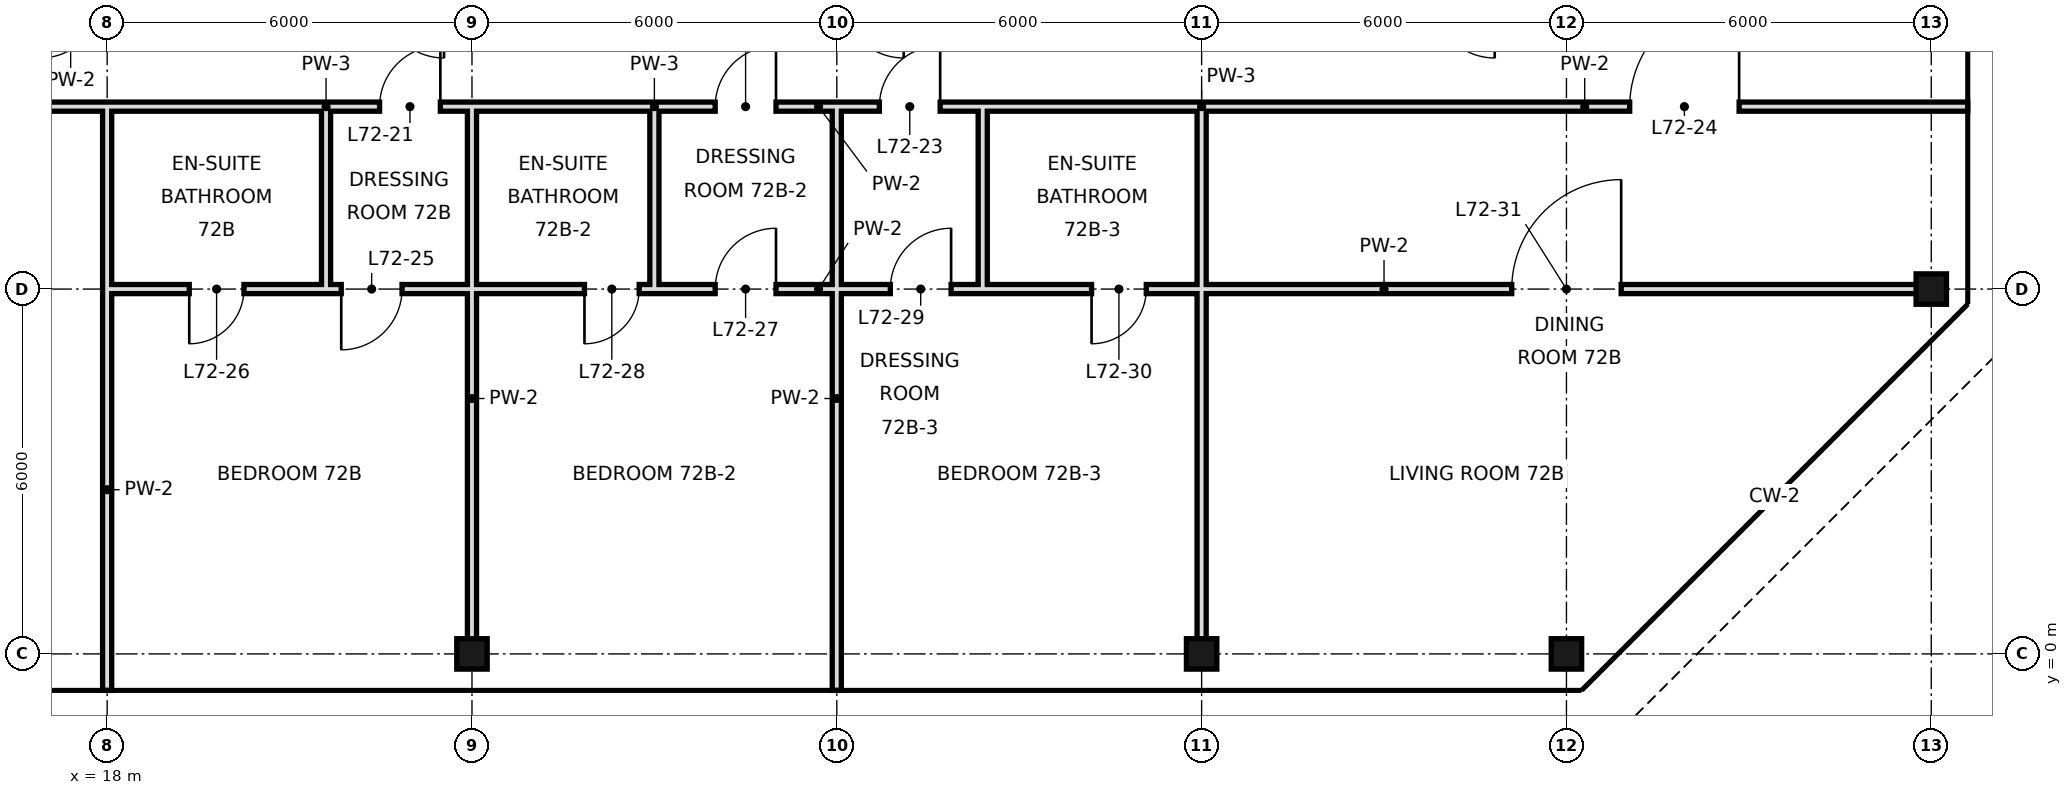
"""IFC4 building model, lengths in metres.
Left out: names, types, materials, properties, quantities, classifications, styles, units other than length and angle.
Written with IfcOpenShell. Run it as: python <this file> out.ifc"""

import sys

from ifc_helpers import new_model, si_unit, direction, frame, frame_2d, origin, origin_2d, place, context, subcontext, project, spatial, rectangle, hollow_rectangle, extrude, element, fill, save


model = new_model("IFC4")
c1 = context("Model", 3, precision=1e-05, world=origin(), true_north=direction((0.0, 1.0)))
c2 = subcontext(c1, "Body", "Model", "MODEL_VIEW")
j1 = project(units=[si_unit("LENGTHUNIT", "METRE"), si_unit("PLANEANGLEUNIT", "RADIAN")], contexts=[c1])
p1 = place(None, origin())
s1 = spatial("IfcSite", under=j1, at=p1, CompositionType="ELEMENT")
p2 = place(p1, origin())
s2 = spatial("IfcBuilding", under=s1, at=p2, CompositionType="ELEMENT")
p3 = place(p2, frame((0.0, 0.0, 305.2)))
s3 = spatial("IfcBuildingStorey", under=s2, at=p3, CompositionType="ELEMENT", Elevation=305.2)
for number, where, z_axis, x_axis in (
    (1, (24.0, 0.0, 0.0), (0.0, 0.0, 1.0), (1.0, 0.0, 0.0)),
    (2, (36.0, 0.0, 0.0), (0.0, 0.0, 1.0), (1.0, 0.0, 0.0)),
    (3, (42.0, 0.0, 0.0), (0.0, 0.0, 1.0), (1.0, 0.0, 0.0)),
    (4, (48.0, 6.0, 0.0), (0.0, 0.0, 1.0), (1.0, 0.0, 0.0)),
):
    element("IfcColumn", number, at=place(p3, frame(where, z_axis=z_axis, x_axis=x_axis)), inside=s3, PredefinedType="COLUMN", context=c2, shape_type="SweptSolid", body=[
        extrude(hollow_rectangle(XDim=0.5, YDim=0.5, WallThickness=0.025, at=origin_2d()), origin(), (0.0, 0.0, 1.0), 3.6),
    ])
p4 = place(p3, frame((18.0, -0.6, 0.0), z_axis=(0.0, 0.0, 1.0), x_axis=(0.0, 1.0, 0.0)))
e5 = element("IfcWall", 5, at=p4, inside=s3, PredefinedType="PARTITIONING", context=c2, shape_type="SweptSolid", body=[
    extrude(rectangle(XDim=6.6, YDim=0.15, at=frame_2d((3.3, 0.0))), origin(), (0.0, 0.0, 1.0), 2.72),
])
p5 = place(p3, frame((18.0, 6.0, 0.0), z_axis=(0.0, 0.0, 1.0), x_axis=(0.0, 1.0, 0.0)))
e6 = element("IfcWall", 6, at=p5, inside=s3, PredefinedType="PARTITIONING", context=c2, shape_type="SweptSolid", body=[
    extrude(rectangle(XDim=3.0, YDim=0.15, at=frame_2d((1.5, 0.0))), origin(), (0.0, 0.0, 1.0), 2.72),
])
p6 = place(p3, frame((21.6, 6.0, 0.0), z_axis=(0.0, 0.0, 1.0), x_axis=(0.0, 1.0, 0.0)))
e7 = element("IfcWall", 7, at=p6, inside=s3, PredefinedType="PARTITIONING", context=c2, shape_type="SweptSolid", body=[
    extrude(rectangle(XDim=3.0, YDim=0.15, at=frame_2d((1.5, 0.0))), origin(), (0.0, 0.0, 1.0), 3.42),
])
p7 = place(p3, frame((24.0, 0.0, 0.0), z_axis=(0.0, 0.0, 1.0), x_axis=(0.0, 1.0, 0.0)))
e8 = element("IfcWall", 8, at=p7, inside=s3, PredefinedType="PARTITIONING", context=c2, shape_type="SweptSolid", body=[
    extrude(rectangle(XDim=6.0, YDim=0.15, at=frame_2d((3.0, 0.0))), origin(), (0.0, 0.0, 1.0), 2.72),
])
p8 = place(p3, frame((24.0, 6.0, 0.0), z_axis=(0.0, 0.0, 1.0), x_axis=(0.0, 1.0, 0.0)))
e9 = element("IfcWall", 9, at=p8, inside=s3, PredefinedType="PARTITIONING", context=c2, shape_type="SweptSolid", body=[
    extrude(rectangle(XDim=3.0, YDim=0.15, at=frame_2d((1.5, 0.0))), origin(), (0.0, 0.0, 1.0), 2.72),
])
p9 = place(p3, frame((27.0, 6.0, 0.0), z_axis=(0.0, 0.0, 1.0), x_axis=(0.0, 1.0, 0.0)))
e10 = element("IfcWall", 10, at=p9, inside=s3, PredefinedType="PARTITIONING", context=c2, shape_type="SweptSolid", body=[
    extrude(rectangle(XDim=3.0, YDim=0.15, at=frame_2d((1.5, 0.0))), origin(), (0.0, 0.0, 1.0), 3.42),
])
p10 = place(p3, frame((30.0, -0.6, 0.0), z_axis=(0.0, 0.0, 1.0), x_axis=(0.0, 1.0, 0.0)))
e11 = element("IfcWall", 11, at=p10, inside=s3, PredefinedType="PARTITIONING", context=c2, shape_type="SweptSolid", body=[
    extrude(rectangle(XDim=9.6, YDim=0.15, at=frame_2d((4.8, 0.0))), origin(), (0.0, 0.0, 1.0), 2.72),
])
p11 = place(p3, frame((32.4, 6.0, 0.0), z_axis=(0.0, 0.0, 1.0), x_axis=(0.0, 1.0, 0.0)))
e12 = element("IfcWall", 12, at=p11, inside=s3, PredefinedType="PARTITIONING", context=c2, shape_type="SweptSolid", body=[
    extrude(rectangle(XDim=3.0, YDim=0.15, at=frame_2d((1.5, 0.0))), origin(), (0.0, 0.0, 1.0), 3.42),
])
p12 = place(p3, frame((36.0, 0.0, 0.0), z_axis=(0.0, 0.0, 1.0), x_axis=(0.0, 1.0, 0.0)))
e13 = element("IfcWall", 13, at=p12, inside=s3, PredefinedType="PARTITIONING", context=c2, shape_type="SweptSolid", body=[
    extrude(rectangle(XDim=6.0, YDim=0.15, at=frame_2d((3.0, 0.0))), origin(), (0.0, 0.0, 1.0), 2.72),
])
p13 = place(p3, frame((36.0, 6.0, 0.0), z_axis=(0.0, 0.0, 1.0), x_axis=(0.0, 1.0, 0.0)))
e14 = element("IfcWall", 14, at=p13, inside=s3, PredefinedType="PARTITIONING", context=c2, shape_type="SweptSolid", body=[
    extrude(rectangle(XDim=3.0, YDim=0.15, at=frame_2d((1.5, 0.0))), origin(), (0.0, 0.0, 1.0), 2.72),
])
p14 = place(p3, frame((21.6, 6.0, 0.0), z_axis=(0.0, 0.0, 1.0), x_axis=(1.0, 0.0, 0.0)))
e15 = element("IfcWall", 15, at=p14, inside=s3, PredefinedType="PARTITIONING", context=c2, shape_type="SweptSolid", body=[
    extrude(rectangle(XDim=2.4, YDim=0.15, at=frame_2d((1.2, 0.0))), origin(), (0.0, 0.0, 1.0), 2.97),
])
p15 = place(p14, frame((0.25, 0.0, 0.0)))
e16 = element("IfcOpeningElement", 16, at=p15, cuts=e15, PredefinedType="OPENING", context=c2, shape_type="SweptSolid", body=[
    extrude(rectangle(XDim=1.0, YDim=2.4, at=frame_2d((0.5, 1.2))), frame((0.0, 0.085, 0.0), z_axis=(0.0, -1.0, 0.0), x_axis=(1.0, 0.0, 0.0)), (0.0, 0.0, 1.0), 0.17),
])
p16 = place(p3, frame((27.0, 6.0, 0.0), z_axis=(0.0, 0.0, 1.0), x_axis=(1.0, 0.0, 0.0)))
e17 = element("IfcWall", 17, at=p16, inside=s3, PredefinedType="PARTITIONING", context=c2, shape_type="SweptSolid", body=[
    extrude(rectangle(XDim=5.4, YDim=0.15, at=frame_2d((2.7, 0.0))), origin(), (0.0, 0.0, 1.0), 2.97),
])
p17 = place(p16, frame((1.0, 0.0, 0.0)))
e18 = element("IfcOpeningElement", 18, at=p17, cuts=e17, PredefinedType="OPENING", context=c2, shape_type="SweptSolid", body=[
    extrude(rectangle(XDim=1.0, YDim=2.4, at=frame_2d((0.5, 1.2))), frame((0.0, 0.085, 0.0), z_axis=(0.0, -1.0, 0.0), x_axis=(1.0, 0.0, 0.0)), (0.0, 0.0, 1.0), 0.17),
])
p18 = place(p16, frame((3.88, 0.0, 0.0)))
e19 = element("IfcOpeningElement", 19, at=p18, cuts=e17, PredefinedType="OPENING", context=c2, shape_type="SweptSolid", body=[
    extrude(rectangle(XDim=1.0, YDim=2.4, at=frame_2d((0.5, 1.2))), frame((0.0, 0.085, 0.0), z_axis=(0.0, -1.0, 0.0), x_axis=(1.0, 0.0, 0.0)), (0.0, 0.0, 1.0), 0.17),
])
p19 = place(p3, frame((36.0, 6.0, 0.0), z_axis=(0.0, 0.0, 1.0), x_axis=(1.0, 0.0, 0.0)))
e20 = element("IfcWall", 20, at=p19, inside=s3, PredefinedType="PARTITIONING", context=c2, shape_type="SweptSolid", body=[
    extrude(rectangle(XDim=12.0, YDim=0.15, at=frame_2d((6.0, 0.0))), origin(), (0.0, 0.0, 1.0), 2.97),
])
p20 = place(p19, frame((5.1, 0.0, 0.0)))
e21 = element("IfcOpeningElement", 21, at=p20, cuts=e20, PredefinedType="OPENING", context=c2, shape_type="SweptSolid", body=[
    extrude(rectangle(XDim=1.8, YDim=2.4, at=frame_2d((0.9, 1.2))), frame((0.0, 0.085, 0.0), z_axis=(0.0, -1.0, 0.0), x_axis=(1.0, 0.0, 0.0)), (0.0, 0.0, 1.0), 0.17),
])
p21 = place(p3, frame((18.0, 6.0, 0.0), z_axis=(0.0, 0.0, 1.0), x_axis=(1.0, 0.0, 0.0)))
e22 = element("IfcWall", 22, at=p21, inside=s3, PredefinedType="PARTITIONING", context=c2, shape_type="SweptSolid", body=[
    extrude(rectangle(XDim=3.6, YDim=0.15, at=frame_2d((1.8, 0.0))), origin(), (0.0, 0.0, 1.0), 2.97),
])
p22 = place(p21, frame((1.35, 0.0, 0.0)))
e23 = element("IfcOpeningElement", 23, at=p22, cuts=e22, PredefinedType="OPENING", context=c2, shape_type="SweptSolid", body=[
    extrude(rectangle(XDim=0.9, YDim=2.4, at=frame_2d((0.45, 1.2))), frame((0.0, 0.085, 0.0), z_axis=(0.0, -1.0, 0.0), x_axis=(1.0, 0.0, 0.0)), (0.0, 0.0, 1.0), 0.17),
])
p23 = place(p3, frame((24.0, 6.0, 0.0), z_axis=(0.0, 0.0, 1.0), x_axis=(1.0, 0.0, 0.0)))
e24 = element("IfcWall", 24, at=p23, inside=s3, PredefinedType="PARTITIONING", context=c2, shape_type="SweptSolid", body=[
    extrude(rectangle(XDim=3.0, YDim=0.15, at=frame_2d((1.5, 0.0))), origin(), (0.0, 0.0, 1.0), 2.97),
])
p24 = place(p23, frame((1.85, 0.0, 0.0)))
e25 = element("IfcOpeningElement", 25, at=p24, cuts=e24, PredefinedType="OPENING", context=c2, shape_type="SweptSolid", body=[
    extrude(rectangle(XDim=0.9, YDim=2.4, at=frame_2d((0.45, 1.2))), frame((0.0, 0.085, 0.0), z_axis=(0.0, -1.0, 0.0), x_axis=(1.0, 0.0, 0.0)), (0.0, 0.0, 1.0), 0.17),
])
p25 = place(p3, frame((32.4, 6.0, 0.0), z_axis=(0.0, 0.0, 1.0), x_axis=(1.0, 0.0, 0.0)))
e26 = element("IfcWall", 26, at=p25, inside=s3, PredefinedType="PARTITIONING", context=c2, shape_type="SweptSolid", body=[
    extrude(rectangle(XDim=3.6, YDim=0.15, at=frame_2d((1.8, 0.0))), origin(), (0.0, 0.0, 1.0), 2.97),
])
p26 = place(p25, frame((1.79, 0.0, 0.0)))
e27 = element("IfcOpeningElement", 27, at=p26, cuts=e26, PredefinedType="OPENING", context=c2, shape_type="SweptSolid", body=[
    extrude(rectangle(XDim=0.9, YDim=2.4, at=frame_2d((0.45, 1.2))), frame((0.0, 0.085, 0.0), z_axis=(0.0, -1.0, 0.0), x_axis=(1.0, 0.0, 0.0)), (0.0, 0.0, 1.0), 0.17),
])
p27 = place(p3, frame((8.4, 9.0, 0.0), z_axis=(0.0, 0.0, 1.0), x_axis=(1.0, 0.0, 0.0)))
e28 = element("IfcWall", 28, at=p27, inside=s3, PredefinedType="PARTITIONING", context=c2, shape_type="SweptSolid", body=[
    extrude(rectangle(XDim=9.6, YDim=0.15, at=frame_2d((4.8, 0.0))), origin(), (0.0, 0.0, 1.0), 3.42),
])
p28 = place(p27, frame((1.72, 0.0, 0.0)))
e29 = element("IfcOpeningElement", 29, at=p28, cuts=e28, PredefinedType="OPENING", context=c2, shape_type="SweptSolid", body=[
    extrude(rectangle(XDim=1.0, YDim=2.4, at=frame_2d((0.5, 1.2))), frame((0.0, 0.085, 0.0), z_axis=(0.0, -1.0, 0.0), x_axis=(1.0, 0.0, 0.0)), (0.0, 0.0, 1.0), 0.17),
])
p29 = place(p27, frame((5.2, 0.0, 0.0)))
e30 = element("IfcOpeningElement", 30, at=p29, cuts=e28, PredefinedType="OPENING", context=c2, shape_type="SweptSolid", body=[
    extrude(rectangle(XDim=1.0, YDim=2.4, at=frame_2d((0.5, 1.2))), frame((0.0, 0.085, 0.0), z_axis=(0.0, -1.0, 0.0), x_axis=(1.0, 0.0, 0.0)), (0.0, 0.0, 1.0), 0.17),
])
p30 = place(p3, frame((21.6, 9.0, 0.0), z_axis=(0.0, 0.0, 1.0), x_axis=(1.0, 0.0, 0.0)))
e31 = element("IfcWall", 31, at=p30, inside=s3, PredefinedType="PARTITIONING", context=c2, shape_type="SweptSolid", body=[
    extrude(rectangle(XDim=2.4, YDim=0.15, at=frame_2d((1.2, 0.0))), origin(), (0.0, 0.0, 1.0), 3.42),
])
p31 = place(p30, frame((0.88, 0.0, 0.0)))
e32 = element("IfcOpeningElement", 32, at=p31, cuts=e31, PredefinedType="OPENING", context=c2, shape_type="SweptSolid", body=[
    extrude(rectangle(XDim=1.0, YDim=2.4, at=frame_2d((0.5, 1.2))), frame((0.0, 0.085, 0.0), z_axis=(0.0, -1.0, 0.0), x_axis=(1.0, 0.0, 0.0)), (0.0, 0.0, 1.0), 0.17),
])
p32 = place(p3, frame((27.0, 9.0, 0.0), z_axis=(0.0, 0.0, 1.0), x_axis=(1.0, 0.0, 0.0)))
e33 = element("IfcWall", 33, at=p32, inside=s3, PredefinedType="PARTITIONING", context=c2, shape_type="SweptSolid", body=[
    extrude(rectangle(XDim=5.4, YDim=0.15, at=frame_2d((2.7, 0.0))), origin(), (0.0, 0.0, 1.0), 3.42),
])
p33 = place(p32, frame((1.0, 0.0, 0.0)))
e34 = element("IfcOpeningElement", 34, at=p33, cuts=e33, PredefinedType="OPENING", context=c2, shape_type="SweptSolid", body=[
    extrude(rectangle(XDim=1.0, YDim=2.4, at=frame_2d((0.5, 1.2))), frame((0.0, 0.085, 0.0), z_axis=(0.0, -1.0, 0.0), x_axis=(1.0, 0.0, 0.0)), (0.0, 0.0, 1.0), 0.17),
])
p34 = place(p32, frame((3.7, 0.0, 0.0)))
e35 = element("IfcOpeningElement", 35, at=p34, cuts=e33, PredefinedType="OPENING", context=c2, shape_type="SweptSolid", body=[
    extrude(rectangle(XDim=1.0, YDim=2.4, at=frame_2d((0.5, 1.2))), frame((0.0, 0.085, 0.0), z_axis=(0.0, -1.0, 0.0), x_axis=(1.0, 0.0, 0.0)), (0.0, 0.0, 1.0), 0.17),
])
p35 = place(p3, frame((36.0, 9.0, 0.0), z_axis=(0.0, 0.0, 1.0), x_axis=(1.0, 0.0, 0.0)))
e36 = element("IfcWall", 36, at=p35, inside=s3, PredefinedType="PARTITIONING", context=c2, shape_type="SweptSolid", body=[
    extrude(rectangle(XDim=12.6, YDim=0.15, at=frame_2d((6.3, 0.0))), origin(), (0.0, 0.0, 1.0), 3.42),
])
p36 = place(p35, frame((7.04, 0.0, 0.0)))
e37 = element("IfcOpeningElement", 37, at=p36, cuts=e36, PredefinedType="OPENING", context=c2, shape_type="SweptSolid", body=[
    extrude(rectangle(XDim=1.8, YDim=2.4, at=frame_2d((0.9, 1.2))), frame((0.0, 0.085, 0.0), z_axis=(0.0, -1.0, 0.0), x_axis=(1.0, 0.0, 0.0)), (0.0, 0.0, 1.0), 0.17),
])
p37 = place(p3, frame((18.0, 9.0, 0.0), z_axis=(0.0, 0.0, 1.0), x_axis=(1.0, 0.0, 0.0)))
e38 = element("IfcWall", 38, at=p37, inside=s3, PredefinedType="PARTITIONING", context=c2, shape_type="SweptSolid", body=[
    extrude(rectangle(XDim=3.6, YDim=0.15, at=frame_2d((1.8, 0.0))), origin(), (0.0, 0.0, 1.0), 3.42),
])
p38 = place(p3, frame((24.0, 9.0, 0.0), z_axis=(0.0, 0.0, 1.0), x_axis=(1.0, 0.0, 0.0)))
e39 = element("IfcWall", 39, at=p38, inside=s3, PredefinedType="PARTITIONING", context=c2, shape_type="SweptSolid", body=[
    extrude(rectangle(XDim=3.0, YDim=0.15, at=frame_2d((1.5, 0.0))), origin(), (0.0, 0.0, 1.0), 3.42),
])
p39 = place(p3, frame((32.4, 9.0, 0.0), z_axis=(0.0, 0.0, 1.0), x_axis=(1.0, 0.0, 0.0)))
e40 = element("IfcWall", 40, at=p39, inside=s3, PredefinedType="PARTITIONING", context=c2, shape_type="SweptSolid", body=[
    extrude(rectangle(XDim=3.6, YDim=0.15, at=frame_2d((1.8, 0.0))), origin(), (0.0, 0.0, 1.0), 3.42),
])
p40 = place(p31, frame((1.0, 0.0, 0.0), z_axis=(0.0, 0.0, 1.0), x_axis=(-1.0, 0.0, 0.0)))
e41 = element("IfcDoor", 41, at=p40, inside=s3, OperationType="SINGLE_SWING_LEFT", PredefinedType="DOOR", context=c2, shape_type="SweptSolid", body=[
    extrude(rectangle(XDim=1.0, YDim=2.4, at=frame_2d((0.5, 1.2))), frame((0.0, 0.025, 0.0), z_axis=(0.0, -1.0, 0.0), x_axis=(1.0, 0.0, 0.0)), (0.0, 0.0, 1.0), 0.05),
])
fill(e32, e41)
p41 = place(p33, frame((1.0, 0.0, 0.0), z_axis=(0.0, 0.0, 1.0), x_axis=(-1.0, 0.0, 0.0)))
e42 = element("IfcDoor", 42, at=p41, inside=s3, OperationType="SINGLE_SWING_LEFT", PredefinedType="DOOR", context=c2, shape_type="SweptSolid", body=[
    extrude(rectangle(XDim=1.0, YDim=2.4, at=frame_2d((0.5, 1.2))), frame((0.0, 0.025, 0.0), z_axis=(0.0, -1.0, 0.0), x_axis=(1.0, 0.0, 0.0)), (0.0, 0.0, 1.0), 0.05),
])
fill(e34, e42)
p42 = place(p34, frame((1.0, 0.0, 0.0), z_axis=(0.0, 0.0, 1.0), x_axis=(-1.0, 0.0, 0.0)))
e43 = element("IfcDoor", 43, at=p42, inside=s3, OperationType="SINGLE_SWING_LEFT", PredefinedType="DOOR", context=c2, shape_type="SweptSolid", body=[
    extrude(rectangle(XDim=1.0, YDim=2.4, at=frame_2d((0.5, 1.2))), frame((0.0, 0.025, 0.0), z_axis=(0.0, -1.0, 0.0), x_axis=(1.0, 0.0, 0.0)), (0.0, 0.0, 1.0), 0.05),
])
fill(e35, e43)
p43 = place(p36, frame((1.8, 0.0, 0.0), z_axis=(0.0, 0.0, 1.0), x_axis=(-1.0, 0.0, 0.0)))
e44 = element("IfcDoor", 44, at=p43, inside=s3, OperationType="SINGLE_SWING_LEFT", PredefinedType="DOOR", context=c2, shape_type="SweptSolid", body=[
    extrude(rectangle(XDim=1.8, YDim=2.4, at=frame_2d((0.9, 1.2))), frame((0.0, 0.025, 0.0), z_axis=(0.0, -1.0, 0.0), x_axis=(1.0, 0.0, 0.0)), (0.0, 0.0, 1.0), 0.05),
])
fill(e37, e44)
p44 = place(p15, frame((1.0, 0.0, 0.0), z_axis=(0.0, 0.0, 1.0), x_axis=(-1.0, 0.0, 0.0)))
e45 = element("IfcDoor", 45, at=p44, inside=s3, OperationType="SINGLE_SWING_RIGHT", PredefinedType="DOOR", context=c2, shape_type="SweptSolid", body=[
    extrude(rectangle(XDim=1.0, YDim=2.4, at=frame_2d((0.5, 1.2))), frame((0.0, 0.025, 0.0), z_axis=(0.0, -1.0, 0.0), x_axis=(1.0, 0.0, 0.0)), (0.0, 0.0, 1.0), 0.05),
])
fill(e16, e45)
p45 = place(p22, frame((0.9, 0.0, 0.0), z_axis=(0.0, 0.0, 1.0), x_axis=(-1.0, 0.0, 0.0)))
e46 = element("IfcDoor", 46, at=p45, inside=s3, OperationType="SINGLE_SWING_RIGHT", PredefinedType="DOOR", context=c2, shape_type="SweptSolid", body=[
    extrude(rectangle(XDim=0.9, YDim=2.4, at=frame_2d((0.45, 1.2))), frame((0.0, 0.025, 0.0), z_axis=(0.0, -1.0, 0.0), x_axis=(1.0, 0.0, 0.0)), (0.0, 0.0, 1.0), 0.05),
])
fill(e23, e46)
p46 = place(p17, frame((1.0, 0.0, 0.0), z_axis=(0.0, 0.0, 1.0), x_axis=(-1.0, 0.0, 0.0)))
e47 = element("IfcDoor", 47, at=p46, inside=s3, OperationType="SINGLE_SWING_LEFT", PredefinedType="DOOR", context=c2, shape_type="SweptSolid", body=[
    extrude(rectangle(XDim=1.0, YDim=2.4, at=frame_2d((0.5, 1.2))), frame((0.0, 0.025, 0.0), z_axis=(0.0, -1.0, 0.0), x_axis=(1.0, 0.0, 0.0)), (0.0, 0.0, 1.0), 0.05),
])
fill(e18, e47)
p47 = place(p24, frame((0.9, 0.0, 0.0), z_axis=(0.0, 0.0, 1.0), x_axis=(-1.0, 0.0, 0.0)))
e48 = element("IfcDoor", 48, at=p47, inside=s3, OperationType="SINGLE_SWING_RIGHT", PredefinedType="DOOR", context=c2, shape_type="SweptSolid", body=[
    extrude(rectangle(XDim=0.9, YDim=2.4, at=frame_2d((0.45, 1.2))), frame((0.0, 0.025, 0.0), z_axis=(0.0, -1.0, 0.0), x_axis=(1.0, 0.0, 0.0)), (0.0, 0.0, 1.0), 0.05),
])
fill(e25, e48)
p48 = place(p18, frame((1.0, 0.0, 0.0), z_axis=(0.0, 0.0, 1.0), x_axis=(-1.0, 0.0, 0.0)))
e49 = element("IfcDoor", 49, at=p48, inside=s3, OperationType="SINGLE_SWING_LEFT", PredefinedType="DOOR", context=c2, shape_type="SweptSolid", body=[
    extrude(rectangle(XDim=1.0, YDim=2.4, at=frame_2d((0.5, 1.2))), frame((0.0, 0.025, 0.0), z_axis=(0.0, -1.0, 0.0), x_axis=(1.0, 0.0, 0.0)), (0.0, 0.0, 1.0), 0.05),
])
fill(e19, e49)
p49 = place(p26, frame((0.9, 0.0, 0.0), z_axis=(0.0, 0.0, 1.0), x_axis=(-1.0, 0.0, 0.0)))
e50 = element("IfcDoor", 50, at=p49, inside=s3, OperationType="SINGLE_SWING_RIGHT", PredefinedType="DOOR", context=c2, shape_type="SweptSolid", body=[
    extrude(rectangle(XDim=0.9, YDim=2.4, at=frame_2d((0.45, 1.2))), frame((0.0, 0.025, 0.0), z_axis=(0.0, -1.0, 0.0), x_axis=(1.0, 0.0, 0.0)), (0.0, 0.0, 1.0), 0.05),
])
fill(e27, e50)
p50 = place(p20, frame((1.8, 0.0, 0.0), z_axis=(0.0, 0.0, 1.0), x_axis=(-1.0, 0.0, 0.0)))
e51 = element("IfcDoor", 51, at=p50, inside=s3, OperationType="SINGLE_SWING_LEFT", PredefinedType="DOOR", context=c2, shape_type="SweptSolid", body=[
    extrude(rectangle(XDim=1.8, YDim=2.4, at=frame_2d((0.9, 1.2))), frame((0.0, 0.025, 0.0), z_axis=(0.0, -1.0, 0.0), x_axis=(1.0, 0.0, 0.0)), (0.0, 0.0, 1.0), 0.05),
])
fill(e21, e51)
save(model, sys.argv[1])
